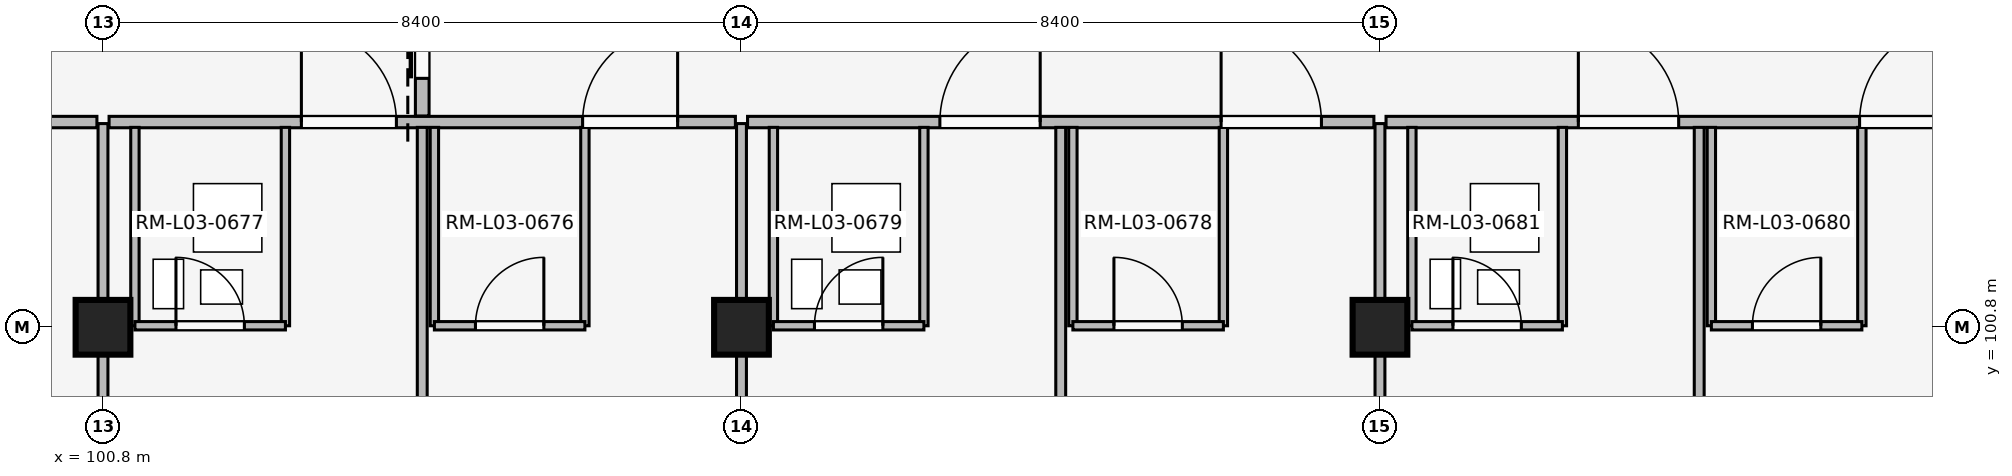
"""IFC4 building model, lengths in metres.
Left out: names, types, materials, properties, quantities, classifications, styles, units other than length and angle.
Written with IfcOpenShell. Run it as: python <this file> out.ifc"""

import sys

from ifc_helpers import new_model, si_unit, direction, frame, frame_2d, origin, origin_2d, place, context, subcontext, project, spatial, rectangle, extrude, element, fill, save


model = new_model("IFC4")
c1 = context("Model", 3, precision=1e-05, world=origin(), true_north=direction((0.0, 1.0)))
c2 = subcontext(c1, "Body", "Model", "MODEL_VIEW")
j1 = project(units=[si_unit("LENGTHUNIT", "METRE"), si_unit("PLANEANGLEUNIT", "RADIAN")], contexts=[c1])
p1 = place(None, origin())
s1 = spatial("IfcSite", under=j1, at=p1, CompositionType="ELEMENT")
p2 = place(p1, origin())
s2 = spatial("IfcBuilding", under=s1, at=p2, CompositionType="ELEMENT")
p3 = place(p2, frame((0.0, 0.0, 12.9)))
s3 = spatial("IfcBuildingStorey", under=s2, at=p3, CompositionType="ELEMENT", Elevation=12.9)
for number, where, z_axis, x_axis in (
    (1, (100.8, 100.8, 0.0), (0.0, 0.0, 1.0), (1.0, 0.0, 0.0)),
    (2, (109.2, 100.8, 0.0), (0.0, 0.0, 1.0), (1.0, 0.0, 0.0)),
    (3, (117.6, 100.8, 0.0), (0.0, 0.0, 1.0), (1.0, 0.0, 0.0)),
):
    element("IfcColumn", number, at=place(p3, frame(where, z_axis=z_axis, x_axis=x_axis)), inside=s3, PredefinedType="COLUMN", context=c2, shape_type="SweptSolid", body=[
        extrude(rectangle(XDim=0.72, YDim=0.72, at=origin_2d()), origin(), (0.0, 0.0, 1.0), 3.3),
    ])
p4 = place(p3, frame((92.76, 103.5, 0.0), z_axis=(0.0, 0.0, 1.0), x_axis=(1.0, 0.0, 0.0)))
e4 = element("IfcWall", 4, at=p4, inside=s3, PredefinedType="PARTITIONING", context=c2, shape_type="SweptSolid", body=[
    extrude(rectangle(XDim=7.96, YDim=0.15, at=frame_2d((3.98, 0.0))), origin(), (0.0, 0.0, 1.0), 2.42),
])
p5 = place(p4, frame((2.25, 0.0, 0.0)))
e5 = element("IfcOpeningElement", 5, at=p5, cuts=e4, PredefinedType="OPENING", context=c2, shape_type="SweptSolid", body=[
    extrude(rectangle(XDim=1.32, YDim=2.25, at=frame_2d((0.66, 1.125))), frame((0.0, 0.085, 0.0), z_axis=(0.0, -1.0, 0.0), x_axis=(1.0, 0.0, 0.0)), (0.0, 0.0, 1.0), 0.17),
])
p6 = place(p4, frame((5.95, 0.0, 0.0)))
e6 = element("IfcOpeningElement", 6, at=p6, cuts=e4, PredefinedType="OPENING", context=c2, shape_type="SweptSolid", body=[
    extrude(rectangle(XDim=1.32, YDim=2.25, at=frame_2d((0.66, 1.125))), frame((0.0, 0.085, 0.0), z_axis=(0.0, -1.0, 0.0), x_axis=(1.0, 0.0, 0.0)), (0.0, 0.0, 1.0), 0.17),
])
p7 = place(p3, frame((100.8, 92.54, 0.0), z_axis=(0.0, 0.0, 1.0), x_axis=(0.0, 1.0, 0.0)))
e7 = element("IfcWall", 7, at=p7, inside=s3, PredefinedType="PARTITIONING", context=c2, shape_type="SweptSolid", body=[
    extrude(rectangle(XDim=10.94, YDim=0.13, at=frame_2d((5.47, 0.0))), origin(), (0.0, 0.0, 1.0), 2.42),
])
p8 = place(p3, frame((100.88, 103.5, 0.0), z_axis=(0.0, 0.0, 1.0), x_axis=(1.0, 0.0, 0.0)))
e8 = element("IfcWall", 8, at=p8, inside=s3, PredefinedType="PARTITIONING", context=c2, shape_type="SweptSolid", body=[
    extrude(rectangle(XDim=8.24, YDim=0.15, at=frame_2d((4.12, 0.0))), origin(), (0.0, 0.0, 1.0), 2.42),
])
p9 = place(p8, frame((2.53, 0.0, 0.0)))
e9 = element("IfcOpeningElement", 9, at=p9, cuts=e8, PredefinedType="OPENING", context=c2, shape_type="SweptSolid", body=[
    extrude(rectangle(XDim=1.25, YDim=2.2, at=frame_2d((0.625, 1.1))), frame((0.0, 0.085, 0.0), z_axis=(0.0, -1.0, 0.0), x_axis=(1.0, 0.0, 0.0)), (0.0, 0.0, 1.0), 0.17),
])
p10 = place(p8, frame((6.23, 0.0, 0.0)))
e10 = element("IfcOpeningElement", 10, at=p10, cuts=e8, PredefinedType="OPENING", context=c2, shape_type="SweptSolid", body=[
    extrude(rectangle(XDim=1.25, YDim=2.2, at=frame_2d((0.625, 1.1))), frame((0.0, 0.085, 0.0), z_axis=(0.0, -1.0, 0.0), x_axis=(1.0, 0.0, 0.0)), (0.0, 0.0, 1.0), 0.17),
])
p11 = place(p3, frame((105.0, 92.5, 0.0), z_axis=(0.0, 0.0, 1.0), x_axis=(0.0, 1.0, 0.0)))
e11 = element("IfcWall", 11, at=p11, inside=s3, PredefinedType="PARTITIONING", context=c2, shape_type="SweptSolid", body=[
    extrude(rectangle(XDim=10.93, YDim=0.13, at=frame_2d((5.465, 0.0))), origin(), (0.0, 0.0, 1.0), 2.42),
])
for number, where, z_axis, x_axis in (
    (12, (101.22, 100.82, 0.0), (0.0, 0.0, 1.0), (0.0, 1.0, 0.0)),
    (13, (103.2, 100.82, 0.0), (0.0, 0.0, 1.0), (0.0, 1.0, 0.0)),
):
    element("IfcWall", number, at=place(p3, frame(where, z_axis=z_axis, x_axis=x_axis)), inside=s3, PredefinedType="PARTITIONING", context=c2, shape_type="SweptSolid", body=[
        extrude(rectangle(XDim=2.61, YDim=0.11, at=frame_2d((1.305, 0.0))), origin(), (0.0, 0.0, 1.0), 2.42),
    ])
p12 = place(p3, frame((101.22, 100.82, 0.0), z_axis=(0.0, 0.0, 1.0), x_axis=(1.0, 0.0, 0.0)))
e14 = element("IfcWall", 14, at=p12, inside=s3, PredefinedType="PARTITIONING", context=c2, shape_type="SweptSolid", body=[
    extrude(rectangle(XDim=1.98, YDim=0.11, at=frame_2d((0.99, 0.0))), origin(), (0.0, 0.0, 1.0), 2.42),
])
p13 = place(p12, frame((0.54, 0.0, 0.0)))
e15 = element("IfcOpeningElement", 15, at=p13, cuts=e14, PredefinedType="OPENING", context=c2, shape_type="SweptSolid", body=[
    extrude(rectangle(XDim=0.9, YDim=2.1, at=frame_2d((0.45, 1.05))), frame((0.0, 0.065, 0.0), z_axis=(0.0, -1.0, 0.0), x_axis=(1.0, 0.0, 0.0)), (0.0, 0.0, 1.0), 0.13),
])
for number, where, z_axis, x_axis in (
    (16, (105.16, 100.82, 0.0), (0.0, 0.0, 1.0), (0.0, 1.0, 0.0)),
    (17, (107.14, 100.82, 0.0), (0.0, 0.0, 1.0), (0.0, 1.0, 0.0)),
):
    element("IfcWall", number, at=place(p3, frame(where, z_axis=z_axis, x_axis=x_axis)), inside=s3, PredefinedType="PARTITIONING", context=c2, shape_type="SweptSolid", body=[
        extrude(rectangle(XDim=2.61, YDim=0.11, at=frame_2d((1.305, 0.0))), origin(), (0.0, 0.0, 1.0), 2.42),
    ])
p14 = place(p3, frame((105.16, 100.82, 0.0), z_axis=(0.0, 0.0, 1.0), x_axis=(1.0, 0.0, 0.0)))
e18 = element("IfcWall", 18, at=p14, inside=s3, PredefinedType="PARTITIONING", context=c2, shape_type="SweptSolid", body=[
    extrude(rectangle(XDim=1.98, YDim=0.11, at=frame_2d((0.99, 0.0))), origin(), (0.0, 0.0, 1.0), 2.42),
])
p15 = place(p14, frame((0.54, 0.0, 0.0)))
e19 = element("IfcOpeningElement", 19, at=p15, cuts=e18, PredefinedType="OPENING", context=c2, shape_type="SweptSolid", body=[
    extrude(rectangle(XDim=0.9, YDim=2.1, at=frame_2d((0.45, 1.05))), frame((0.0, 0.065, 0.0), z_axis=(0.0, -1.0, 0.0), x_axis=(1.0, 0.0, 0.0)), (0.0, 0.0, 1.0), 0.13),
])
p16 = place(p3, frame((105.0, 103.58, 0.0), z_axis=(0.0, 0.0, 1.0), x_axis=(0.0, 1.0, 0.0)))
e20 = element("IfcWall", 20, at=p16, inside=s3, PredefinedType="PARTITIONING", context=c2, shape_type="SweptSolid", body=[
    extrude(rectangle(XDim=2.84, YDim=0.18, at=frame_2d((1.42, 0.0))), origin(), (0.0, 0.0, 1.0), 2.42),
])
p17 = place(p16, frame((0.495, 0.0, 0.0)))
e21 = element("IfcOpeningElement", 21, at=p17, cuts=e20, PredefinedType="OPENING", context=c2, shape_type="SweptSolid", body=[
    extrude(rectangle(XDim=1.85, YDim=2.3, at=frame_2d((0.925, 1.15))), frame((0.0, 0.1, 0.0), z_axis=(0.0, -1.0, 0.0), x_axis=(1.0, 0.0, 0.0)), (0.0, 0.0, 1.0), 0.2),
])
p18 = place(p3, frame((109.2, 92.54, 0.0), z_axis=(0.0, 0.0, 1.0), x_axis=(0.0, 1.0, 0.0)))
e22 = element("IfcWall", 22, at=p18, inside=s3, PredefinedType="PARTITIONING", context=c2, shape_type="SweptSolid", body=[
    extrude(rectangle(XDim=10.94, YDim=0.13, at=frame_2d((5.47, 0.0))), origin(), (0.0, 0.0, 1.0), 2.42),
])
p19 = place(p3, frame((109.28, 103.5, 0.0), z_axis=(0.0, 0.0, 1.0), x_axis=(1.0, 0.0, 0.0)))
e23 = element("IfcWall", 23, at=p19, inside=s3, PredefinedType="PARTITIONING", context=c2, shape_type="SweptSolid", body=[
    extrude(rectangle(XDim=8.24, YDim=0.15, at=frame_2d((4.12, 0.0))), origin(), (0.0, 0.0, 1.0), 2.42),
])
p20 = place(p19, frame((2.53, 0.0, 0.0)))
e24 = element("IfcOpeningElement", 24, at=p20, cuts=e23, PredefinedType="OPENING", context=c2, shape_type="SweptSolid", body=[
    extrude(rectangle(XDim=1.32, YDim=2.25, at=frame_2d((0.66, 1.125))), frame((0.0, 0.085, 0.0), z_axis=(0.0, -1.0, 0.0), x_axis=(1.0, 0.0, 0.0)), (0.0, 0.0, 1.0), 0.17),
])
p21 = place(p19, frame((6.23, 0.0, 0.0)))
e25 = element("IfcOpeningElement", 25, at=p21, cuts=e23, PredefinedType="OPENING", context=c2, shape_type="SweptSolid", body=[
    extrude(rectangle(XDim=1.32, YDim=2.25, at=frame_2d((0.66, 1.125))), frame((0.0, 0.085, 0.0), z_axis=(0.0, -1.0, 0.0), x_axis=(1.0, 0.0, 0.0)), (0.0, 0.0, 1.0), 0.17),
])
p22 = place(p3, frame((113.4, 92.5, 0.0), z_axis=(0.0, 0.0, 1.0), x_axis=(0.0, 1.0, 0.0)))
e26 = element("IfcWall", 26, at=p22, inside=s3, PredefinedType="PARTITIONING", context=c2, shape_type="SweptSolid", body=[
    extrude(rectangle(XDim=10.93, YDim=0.13, at=frame_2d((5.465, 0.0))), origin(), (0.0, 0.0, 1.0), 2.42),
])
for number, where, z_axis, x_axis in (
    (27, (109.62, 100.82, 0.0), (0.0, 0.0, 1.0), (0.0, 1.0, 0.0)),
    (28, (111.6, 100.82, 0.0), (0.0, 0.0, 1.0), (0.0, 1.0, 0.0)),
):
    element("IfcWall", number, at=place(p3, frame(where, z_axis=z_axis, x_axis=x_axis)), inside=s3, PredefinedType="PARTITIONING", context=c2, shape_type="SweptSolid", body=[
        extrude(rectangle(XDim=2.61, YDim=0.11, at=frame_2d((1.305, 0.0))), origin(), (0.0, 0.0, 1.0), 2.42),
    ])
p23 = place(p3, frame((109.62, 100.82, 0.0), z_axis=(0.0, 0.0, 1.0), x_axis=(1.0, 0.0, 0.0)))
e29 = element("IfcWall", 29, at=p23, inside=s3, PredefinedType="PARTITIONING", context=c2, shape_type="SweptSolid", body=[
    extrude(rectangle(XDim=1.98, YDim=0.11, at=frame_2d((0.99, 0.0))), origin(), (0.0, 0.0, 1.0), 2.42),
])
p24 = place(p23, frame((0.54, 0.0, 0.0)))
e30 = element("IfcOpeningElement", 30, at=p24, cuts=e29, PredefinedType="OPENING", context=c2, shape_type="SweptSolid", body=[
    extrude(rectangle(XDim=0.9, YDim=2.1, at=frame_2d((0.45, 1.05))), frame((0.0, 0.065, 0.0), z_axis=(0.0, -1.0, 0.0), x_axis=(1.0, 0.0, 0.0)), (0.0, 0.0, 1.0), 0.13),
])
for number, where, z_axis, x_axis in (
    (31, (113.56, 100.82, 0.0), (0.0, 0.0, 1.0), (0.0, 1.0, 0.0)),
    (32, (115.54, 100.82, 0.0), (0.0, 0.0, 1.0), (0.0, 1.0, 0.0)),
):
    element("IfcWall", number, at=place(p3, frame(where, z_axis=z_axis, x_axis=x_axis)), inside=s3, PredefinedType="PARTITIONING", context=c2, shape_type="SweptSolid", body=[
        extrude(rectangle(XDim=2.61, YDim=0.11, at=frame_2d((1.305, 0.0))), origin(), (0.0, 0.0, 1.0), 2.42),
    ])
p25 = place(p3, frame((113.56, 100.82, 0.0), z_axis=(0.0, 0.0, 1.0), x_axis=(1.0, 0.0, 0.0)))
e33 = element("IfcWall", 33, at=p25, inside=s3, PredefinedType="PARTITIONING", context=c2, shape_type="SweptSolid", body=[
    extrude(rectangle(XDim=1.98, YDim=0.11, at=frame_2d((0.99, 0.0))), origin(), (0.0, 0.0, 1.0), 2.42),
])
p26 = place(p25, frame((0.54, 0.0, 0.0)))
e34 = element("IfcOpeningElement", 34, at=p26, cuts=e33, PredefinedType="OPENING", context=c2, shape_type="SweptSolid", body=[
    extrude(rectangle(XDim=0.9, YDim=2.1, at=frame_2d((0.45, 1.05))), frame((0.0, 0.065, 0.0), z_axis=(0.0, -1.0, 0.0), x_axis=(1.0, 0.0, 0.0)), (0.0, 0.0, 1.0), 0.13),
])
p27 = place(p3, frame((117.6, 92.54, 0.0), z_axis=(0.0, 0.0, 1.0), x_axis=(0.0, 1.0, 0.0)))
e35 = element("IfcWall", 35, at=p27, inside=s3, PredefinedType="PARTITIONING", context=c2, shape_type="SweptSolid", body=[
    extrude(rectangle(XDim=10.94, YDim=0.13, at=frame_2d((5.47, 0.0))), origin(), (0.0, 0.0, 1.0), 2.42),
])
p28 = place(p3, frame((117.68, 103.5, 0.0), z_axis=(0.0, 0.0, 1.0), x_axis=(1.0, 0.0, 0.0)))
e36 = element("IfcWall", 36, at=p28, inside=s3, PredefinedType="PARTITIONING", context=c2, shape_type="SweptSolid", body=[
    extrude(rectangle(XDim=8.24, YDim=0.15, at=frame_2d((4.12, 0.0))), origin(), (0.0, 0.0, 1.0), 2.42),
])
p29 = place(p28, frame((2.53, 0.0, 0.0)))
e37 = element("IfcOpeningElement", 37, at=p29, cuts=e36, PredefinedType="OPENING", context=c2, shape_type="SweptSolid", body=[
    extrude(rectangle(XDim=1.32, YDim=2.25, at=frame_2d((0.66, 1.125))), frame((0.0, 0.085, 0.0), z_axis=(0.0, -1.0, 0.0), x_axis=(1.0, 0.0, 0.0)), (0.0, 0.0, 1.0), 0.17),
])
p30 = place(p28, frame((6.23, 0.0, 0.0)))
e38 = element("IfcOpeningElement", 38, at=p30, cuts=e36, PredefinedType="OPENING", context=c2, shape_type="SweptSolid", body=[
    extrude(rectangle(XDim=1.32, YDim=2.25, at=frame_2d((0.66, 1.125))), frame((0.0, 0.085, 0.0), z_axis=(0.0, -1.0, 0.0), x_axis=(1.0, 0.0, 0.0)), (0.0, 0.0, 1.0), 0.17),
])
p31 = place(p3, frame((121.8, 92.5, 0.0), z_axis=(0.0, 0.0, 1.0), x_axis=(0.0, 1.0, 0.0)))
e39 = element("IfcWall", 39, at=p31, inside=s3, PredefinedType="PARTITIONING", context=c2, shape_type="SweptSolid", body=[
    extrude(rectangle(XDim=10.93, YDim=0.13, at=frame_2d((5.465, 0.0))), origin(), (0.0, 0.0, 1.0), 2.42),
])
for number, where, z_axis, x_axis in (
    (40, (118.02, 100.82, 0.0), (0.0, 0.0, 1.0), (0.0, 1.0, 0.0)),
    (41, (120.0, 100.82, 0.0), (0.0, 0.0, 1.0), (0.0, 1.0, 0.0)),
):
    element("IfcWall", number, at=place(p3, frame(where, z_axis=z_axis, x_axis=x_axis)), inside=s3, PredefinedType="PARTITIONING", context=c2, shape_type="SweptSolid", body=[
        extrude(rectangle(XDim=2.61, YDim=0.11, at=frame_2d((1.305, 0.0))), origin(), (0.0, 0.0, 1.0), 2.42),
    ])
p32 = place(p3, frame((118.02, 100.82, 0.0), z_axis=(0.0, 0.0, 1.0), x_axis=(1.0, 0.0, 0.0)))
e42 = element("IfcWall", 42, at=p32, inside=s3, PredefinedType="PARTITIONING", context=c2, shape_type="SweptSolid", body=[
    extrude(rectangle(XDim=1.98, YDim=0.11, at=frame_2d((0.99, 0.0))), origin(), (0.0, 0.0, 1.0), 2.42),
])
p33 = place(p32, frame((0.54, 0.0, 0.0)))
e43 = element("IfcOpeningElement", 43, at=p33, cuts=e42, PredefinedType="OPENING", context=c2, shape_type="SweptSolid", body=[
    extrude(rectangle(XDim=0.9, YDim=2.1, at=frame_2d((0.45, 1.05))), frame((0.0, 0.065, 0.0), z_axis=(0.0, -1.0, 0.0), x_axis=(1.0, 0.0, 0.0)), (0.0, 0.0, 1.0), 0.13),
])
for number, where, z_axis, x_axis in (
    (44, (121.96, 100.82, 0.0), (0.0, 0.0, 1.0), (0.0, 1.0, 0.0)),
    (45, (123.94, 100.82, 0.0), (0.0, 0.0, 1.0), (0.0, 1.0, 0.0)),
):
    element("IfcWall", number, at=place(p3, frame(where, z_axis=z_axis, x_axis=x_axis)), inside=s3, PredefinedType="PARTITIONING", context=c2, shape_type="SweptSolid", body=[
        extrude(rectangle(XDim=2.61, YDim=0.11, at=frame_2d((1.305, 0.0))), origin(), (0.0, 0.0, 1.0), 2.42),
    ])
p34 = place(p3, frame((121.96, 100.82, 0.0), z_axis=(0.0, 0.0, 1.0), x_axis=(1.0, 0.0, 0.0)))
e46 = element("IfcWall", 46, at=p34, inside=s3, PredefinedType="PARTITIONING", context=c2, shape_type="SweptSolid", body=[
    extrude(rectangle(XDim=1.98, YDim=0.11, at=frame_2d((0.99, 0.0))), origin(), (0.0, 0.0, 1.0), 2.42),
])
p35 = place(p34, frame((0.54, 0.0, 0.0)))
e47 = element("IfcOpeningElement", 47, at=p35, cuts=e46, PredefinedType="OPENING", context=c2, shape_type="SweptSolid", body=[
    extrude(rectangle(XDim=0.9, YDim=2.1, at=frame_2d((0.45, 1.05))), frame((0.0, 0.065, 0.0), z_axis=(0.0, -1.0, 0.0), x_axis=(1.0, 0.0, 0.0)), (0.0, 0.0, 1.0), 0.13),
])
p36 = place(p9, origin())
e48 = element("IfcDoor", 48, at=p36, inside=s3, OperationType="SINGLE_SWING_LEFT", PredefinedType="DOOR", context=c2, shape_type="SweptSolid", body=[
    extrude(rectangle(XDim=1.25, YDim=2.2, at=frame_2d((0.625, 1.1))), frame((0.0, 0.025, 0.0), z_axis=(0.0, -1.0, 0.0), x_axis=(1.0, 0.0, 0.0)), (0.0, 0.0, 1.0), 0.05),
])
fill(e9, e48)
p37 = place(p10, origin())
e49 = element("IfcDoor", 49, at=p37, inside=s3, OperationType="SINGLE_SWING_RIGHT", PredefinedType="DOOR", context=c2, shape_type="SweptSolid", body=[
    extrude(rectangle(XDim=1.25, YDim=2.2, at=frame_2d((0.625, 1.1))), frame((0.0, 0.025, 0.0), z_axis=(0.0, -1.0, 0.0), x_axis=(1.0, 0.0, 0.0)), (0.0, 0.0, 1.0), 0.05),
])
fill(e10, e49)
p38 = place(p13, origin())
e50 = element("IfcDoor", 50, at=p38, inside=s3, OperationType="SINGLE_SWING_LEFT", PredefinedType="DOOR", context=c2, shape_type="SweptSolid", body=[
    extrude(rectangle(XDim=0.9, YDim=2.1, at=frame_2d((0.45, 1.05))), frame((0.0, 0.025, 0.0), z_axis=(0.0, -1.0, 0.0), x_axis=(1.0, 0.0, 0.0)), (0.0, 0.0, 1.0), 0.05),
])
fill(e15, e50)
p39 = place(p15, origin())
e51 = element("IfcDoor", 51, at=p39, inside=s3, OperationType="SINGLE_SWING_RIGHT", PredefinedType="DOOR", context=c2, shape_type="SweptSolid", body=[
    extrude(rectangle(XDim=0.9, YDim=2.1, at=frame_2d((0.45, 1.05))), frame((0.0, 0.025, 0.0), z_axis=(0.0, -1.0, 0.0), x_axis=(1.0, 0.0, 0.0)), (0.0, 0.0, 1.0), 0.05),
])
fill(e19, e51)
p40 = place(p17, origin())
e52 = element("IfcDoor", 52, at=p40, inside=s3, OperationType="SLIDING_TO_LEFT", PredefinedType="DOOR", context=c2, shape_type="SweptSolid", body=[
    extrude(rectangle(XDim=1.85, YDim=2.3, at=frame_2d((0.925, 1.15))), frame((0.0, 0.025, 0.0), z_axis=(0.0, -1.0, 0.0), x_axis=(1.0, 0.0, 0.0)), (0.0, 0.0, 1.0), 0.05),
])
fill(e21, e52)
p41 = place(p20, origin())
e53 = element("IfcDoor", 53, at=p41, inside=s3, OperationType="SINGLE_SWING_RIGHT", PredefinedType="DOOR", context=c2, shape_type="SweptSolid", body=[
    extrude(rectangle(XDim=1.32, YDim=2.25, at=frame_2d((0.66, 1.125))), frame((0.0, 0.025, 0.0), z_axis=(0.0, -1.0, 0.0), x_axis=(1.0, 0.0, 0.0)), (0.0, 0.0, 1.0), 0.05),
])
fill(e24, e53)
p42 = place(p21, origin())
e54 = element("IfcDoor", 54, at=p42, inside=s3, OperationType="SINGLE_SWING_LEFT", PredefinedType="DOOR", context=c2, shape_type="SweptSolid", body=[
    extrude(rectangle(XDim=1.32, YDim=2.25, at=frame_2d((0.66, 1.125))), frame((0.0, 0.025, 0.0), z_axis=(0.0, -1.0, 0.0), x_axis=(1.0, 0.0, 0.0)), (0.0, 0.0, 1.0), 0.05),
])
fill(e25, e54)
p43 = place(p24, origin())
e55 = element("IfcDoor", 55, at=p43, inside=s3, OperationType="SINGLE_SWING_RIGHT", PredefinedType="DOOR", context=c2, shape_type="SweptSolid", body=[
    extrude(rectangle(XDim=0.9, YDim=2.1, at=frame_2d((0.45, 1.05))), frame((0.0, 0.025, 0.0), z_axis=(0.0, -1.0, 0.0), x_axis=(1.0, 0.0, 0.0)), (0.0, 0.0, 1.0), 0.05),
])
fill(e30, e55)
p44 = place(p26, origin())
e56 = element("IfcDoor", 56, at=p44, inside=s3, OperationType="SINGLE_SWING_LEFT", PredefinedType="DOOR", context=c2, shape_type="SweptSolid", body=[
    extrude(rectangle(XDim=0.9, YDim=2.1, at=frame_2d((0.45, 1.05))), frame((0.0, 0.025, 0.0), z_axis=(0.0, -1.0, 0.0), x_axis=(1.0, 0.0, 0.0)), (0.0, 0.0, 1.0), 0.05),
])
fill(e34, e56)
p45 = place(p29, origin())
e57 = element("IfcDoor", 57, at=p45, inside=s3, OperationType="SINGLE_SWING_LEFT", PredefinedType="DOOR", context=c2, shape_type="SweptSolid", body=[
    extrude(rectangle(XDim=1.32, YDim=2.25, at=frame_2d((0.66, 1.125))), frame((0.0, 0.025, 0.0), z_axis=(0.0, -1.0, 0.0), x_axis=(1.0, 0.0, 0.0)), (0.0, 0.0, 1.0), 0.05),
])
fill(e37, e57)
p46 = place(p30, origin())
e58 = element("IfcDoor", 58, at=p46, inside=s3, OperationType="SINGLE_SWING_RIGHT", PredefinedType="DOOR", context=c2, shape_type="SweptSolid", body=[
    extrude(rectangle(XDim=1.32, YDim=2.25, at=frame_2d((0.66, 1.125))), frame((0.0, 0.025, 0.0), z_axis=(0.0, -1.0, 0.0), x_axis=(1.0, 0.0, 0.0)), (0.0, 0.0, 1.0), 0.05),
])
fill(e38, e58)
p47 = place(p33, origin())
e59 = element("IfcDoor", 59, at=p47, inside=s3, OperationType="SINGLE_SWING_LEFT", PredefinedType="DOOR", context=c2, shape_type="SweptSolid", body=[
    extrude(rectangle(XDim=0.9, YDim=2.1, at=frame_2d((0.45, 1.05))), frame((0.0, 0.025, 0.0), z_axis=(0.0, -1.0, 0.0), x_axis=(1.0, 0.0, 0.0)), (0.0, 0.0, 1.0), 0.05),
])
fill(e43, e59)
p48 = place(p35, origin())
e60 = element("IfcDoor", 60, at=p48, inside=s3, OperationType="SINGLE_SWING_RIGHT", PredefinedType="DOOR", context=c2, shape_type="SweptSolid", body=[
    extrude(rectangle(XDim=0.9, YDim=2.1, at=frame_2d((0.45, 1.05))), frame((0.0, 0.025, 0.0), z_axis=(0.0, -1.0, 0.0), x_axis=(1.0, 0.0, 0.0)), (0.0, 0.0, 1.0), 0.05),
])
fill(e47, e60)
save(model, sys.argv[1])
